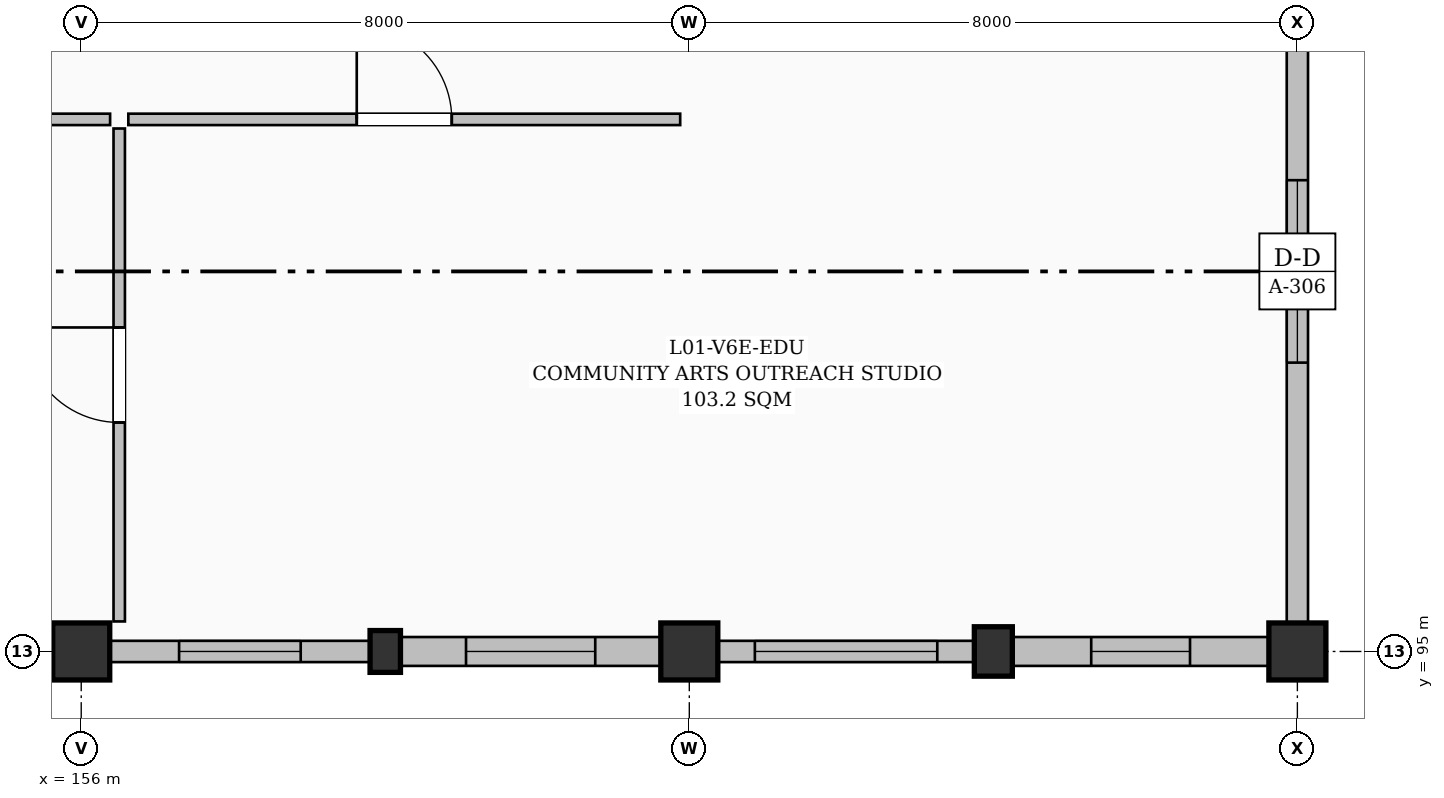
"""IFC4 building model, lengths in metres.
Left out: names, types, materials, properties, quantities, classifications, styles, units other than length and angle.
Written with IfcOpenShell. Run it as: python <this file> out.ifc"""

import sys

from ifc_helpers import new_model, si_unit, direction, frame, frame_2d, origin, origin_2d, place, context, subcontext, project, spatial, rectangle, extrude, element, fill, save


model = new_model("IFC4")
c1 = context("Model", 3, precision=1e-05, world=origin(), true_north=direction((0.0, 1.0)))
c2 = subcontext(c1, "Body", "Model", "MODEL_VIEW")
j1 = project(units=[si_unit("LENGTHUNIT", "METRE"), si_unit("PLANEANGLEUNIT", "RADIAN")], contexts=[c1])
p1 = place(None, origin())
s1 = spatial("IfcSite", under=j1, at=p1, CompositionType="ELEMENT")
p2 = place(p1, origin())
s2 = spatial("IfcBuilding", under=s1, at=p2, CompositionType="ELEMENT")
p3 = place(p2, frame((0.0, 0.0, 4.8)))
s3 = spatial("IfcBuildingStorey", under=s2, at=p3, CompositionType="ELEMENT", Elevation=4.8)
p4 = place(p3, frame((156.0, 95.0, 0.0), z_axis=(0.0, 0.0, 1.0), x_axis=(1.0, 0.0, 0.0)))
e1 = element("IfcColumn", 1, at=p4, inside=s3, PredefinedType="COLUMN", context=c2, shape_type="SweptSolid", body=[
    extrude(rectangle(XDim=0.75, YDim=0.75, at=origin_2d()), origin(), (0.0, 0.0, 1.0), 4.5),
])
p5 = place(p3, frame((160.0, 95.0, 0.0), z_axis=(0.0, 0.0, 1.0), x_axis=(1.0, 0.0, 0.0)))
e2 = element("IfcColumn", 2, at=p5, inside=s3, PredefinedType="PILASTER", context=c2, shape_type="SweptSolid", body=[
    extrude(rectangle(XDim=0.4, YDim=0.55, at=origin_2d()), origin(), (0.0, 0.0, 1.0), 4.5),
])
p6 = place(p3, frame((164.0, 95.0, 0.0), z_axis=(0.0, 0.0, 1.0), x_axis=(1.0, 0.0, 0.0)))
e3 = element("IfcColumn", 3, at=p6, inside=s3, PredefinedType="COLUMN", context=c2, shape_type="SweptSolid", body=[
    extrude(rectangle(XDim=0.75, YDim=0.75, at=origin_2d()), origin(), (0.0, 0.0, 1.0), 4.5),
])
p7 = place(p3, frame((168.0, 95.0, 0.0), z_axis=(0.0, 0.0, 1.0), x_axis=(1.0, 0.0, 0.0)))
e4 = element("IfcColumn", 4, at=p7, inside=s3, PredefinedType="PILASTER", context=c2, shape_type="SweptSolid", body=[
    extrude(rectangle(XDim=0.5, YDim=0.65, at=origin_2d()), origin(), (0.0, 0.0, 1.0), 4.5),
])
p8 = place(p3, frame((172.0, 95.0, 0.0), z_axis=(0.0, 0.0, 1.0), x_axis=(1.0, 0.0, 0.0)))
e5 = element("IfcColumn", 5, at=p8, inside=s3, PredefinedType="COLUMN", context=c2, shape_type="SweptSolid", body=[
    extrude(rectangle(XDim=0.75, YDim=0.75, at=origin_2d()), origin(), (0.0, 0.0, 1.0), 4.5),
])
p9 = place(p3, frame((172.0, 104.625, 0.0), z_axis=(0.0, 0.0, 1.0), x_axis=(0.0, -1.0, 0.0)))
e6 = element("IfcWall", 6, at=p9, inside=s3, PredefinedType="SOLIDWALL", context=c2, shape_type="SweptSolid", body=[
    extrude(rectangle(XDim=9.25, YDim=0.28, at=frame_2d((4.625, 0.0))), origin(), (0.0, 0.0, 1.0), 4.035),
])
p10 = place(p9, frame((3.425, 0.0, 0.95)))
e7 = element("IfcOpeningElement", 7, at=p10, cuts=e6, PredefinedType="OPENING", context=c2, shape_type="SweptSolid", body=[
    extrude(rectangle(XDim=2.4, YDim=1.2, at=frame_2d((1.2, 0.6))), frame((0.0, 0.15, 0.0), z_axis=(0.0, -1.0, 0.0), x_axis=(1.0, 0.0, 0.0)), (0.0, 0.0, 1.0), 0.3),
])
p11 = place(p3, frame((171.625, 95.0, 0.0), z_axis=(0.0, 0.0, 1.0), x_axis=(-1.0, 0.0, 0.0)))
e8 = element("IfcWall", 8, at=p11, inside=s3, PredefinedType="SOLIDWALL", context=c2, shape_type="SweptSolid", body=[
    extrude(rectangle(XDim=3.375, YDim=0.38, at=frame_2d((1.688, 0.0))), origin(), (0.0, 0.0, 1.0), 3.635),
])
p12 = place(p11, frame((1.038, 0.0, 0.95)))
e9 = element("IfcOpeningElement", 9, at=p12, cuts=e8, PredefinedType="OPENING", context=c2, shape_type="SweptSolid", body=[
    extrude(rectangle(XDim=1.3, YDim=1.4, at=frame_2d((0.65, 0.7))), frame((0.0, 0.2, 0.0), z_axis=(0.0, -1.0, 0.0), x_axis=(1.0, 0.0, 0.0)), (0.0, 0.0, 1.0), 0.4),
])
p13 = place(p3, frame((167.75, 95.0, 0.0), z_axis=(0.0, 0.0, 1.0), x_axis=(-1.0, 0.0, 0.0)))
e10 = element("IfcWall", 10, at=p13, inside=s3, PredefinedType="SOLIDWALL", context=c2, shape_type="SweptSolid", body=[
    extrude(rectangle(XDim=3.375, YDim=0.28, at=frame_2d((1.688, 0.0))), origin(), (0.0, 0.0, 1.0), 3.635),
])
p14 = place(p13, frame((0.488, 0.0, 0.95)))
e11 = element("IfcOpeningElement", 11, at=p14, cuts=e10, PredefinedType="OPENING", context=c2, shape_type="SweptSolid", body=[
    extrude(rectangle(XDim=2.4, YDim=1.2, at=frame_2d((1.2, 0.6))), frame((0.0, 0.15, 0.0), z_axis=(0.0, -1.0, 0.0), x_axis=(1.0, 0.0, 0.0)), (0.0, 0.0, 1.0), 0.3),
])
p15 = place(p3, frame((163.625, 95.0, 0.0), z_axis=(0.0, 0.0, 1.0), x_axis=(-1.0, 0.0, 0.0)))
e12 = element("IfcWall", 12, at=p15, inside=s3, PredefinedType="SOLIDWALL", context=c2, shape_type="SweptSolid", body=[
    extrude(rectangle(XDim=3.425, YDim=0.38, at=frame_2d((1.712, 0.0))), origin(), (0.0, 0.0, 1.0), 3.685),
])
p16 = place(p15, frame((0.863, 0.0, 0.95)))
e13 = element("IfcOpeningElement", 13, at=p16, cuts=e12, PredefinedType="OPENING", context=c2, shape_type="SweptSolid", body=[
    extrude(rectangle(XDim=1.7, YDim=2.0, at=frame_2d((0.85, 1.0))), frame((0.0, 0.2, 0.0), z_axis=(0.0, -1.0, 0.0), x_axis=(1.0, 0.0, 0.0)), (0.0, 0.0, 1.0), 0.4),
])
p17 = place(p3, frame((159.8, 95.0, 0.0), z_axis=(0.0, 0.0, 1.0), x_axis=(-1.0, 0.0, 0.0)))
e14 = element("IfcWall", 14, at=p17, inside=s3, PredefinedType="SOLIDWALL", context=c2, shape_type="SweptSolid", body=[
    extrude(rectangle(XDim=3.425, YDim=0.28, at=frame_2d((1.712, 0.0))), origin(), (0.0, 0.0, 1.0), 3.685),
])
p18 = place(p17, frame((0.913, 0.0, 0.95)))
e15 = element("IfcOpeningElement", 15, at=p18, cuts=e14, PredefinedType="OPENING", context=c2, shape_type="SweptSolid", body=[
    extrude(rectangle(XDim=1.6, YDim=1.8, at=frame_2d((0.8, 0.9))), frame((0.0, 0.15, 0.0), z_axis=(0.0, -1.0, 0.0), x_axis=(1.0, 0.0, 0.0)), (0.0, 0.0, 1.0), 0.3),
])
p19 = place(p3, frame((155.625, 95.0, 0.0), z_axis=(0.0, 0.0, 1.0), x_axis=(-1.0, 0.0, 0.0)))
e16 = element("IfcWall", 16, at=p19, inside=s3, PredefinedType="SOLIDWALL", context=c2, shape_type="SweptSolid", body=[
    extrude(rectangle(XDim=3.4, YDim=0.38, at=frame_2d((1.7, 0.0))), origin(), (0.0, 0.0, 1.0), 3.735),
])
p20 = place(p19, frame((0.6, 0.0, 0.95)))
e17 = element("IfcOpeningElement", 17, at=p20, cuts=e16, PredefinedType="OPENING", context=c2, shape_type="SweptSolid", body=[
    extrude(rectangle(XDim=2.2, YDim=1.8, at=frame_2d((1.1, 0.9))), frame((0.0, 0.2, 0.0), z_axis=(0.0, -1.0, 0.0), x_axis=(1.0, 0.0, 0.0)), (0.0, 0.0, 1.0), 0.4),
])
p21 = place(p3, frame((156.62, 102.0, 0.0), z_axis=(0.0, 0.0, 1.0), x_axis=(1.0, 0.0, 0.0)))
e18 = element("IfcWall", 18, at=p21, inside=s3, PredefinedType="PARTITIONING", context=c2, shape_type="SweptSolid", body=[
    extrude(rectangle(XDim=7.26, YDim=0.15, at=frame_2d((3.63, 0.0))), origin(), (0.0, 0.0, 1.0), 3.905),
])
p22 = place(p21, frame((3.005, 0.0, 0.0)))
e19 = element("IfcOpeningElement", 19, at=p22, cuts=e18, PredefinedType="OPENING", context=c2, shape_type="SweptSolid", body=[
    extrude(rectangle(XDim=1.25, YDim=2.15, at=frame_2d((0.625, 1.075))), frame((0.0, 0.085, 0.0), z_axis=(0.0, -1.0, 0.0), x_axis=(1.0, 0.0, 0.0)), (0.0, 0.0, 1.0), 0.17),
])
p23 = place(p3, frame((156.5, 95.395, 0.0), z_axis=(0.0, 0.0, 1.0), x_axis=(0.0, 1.0, 0.0)))
e20 = element("IfcWall", 20, at=p23, inside=s3, PredefinedType="PARTITIONING", context=c2, shape_type="SweptSolid", body=[
    extrude(rectangle(XDim=6.485, YDim=0.15, at=frame_2d((3.242, 0.0))), origin(), (0.0, 0.0, 1.0), 4.25),
])
p24 = place(p23, frame((2.617, 0.0, 0.0)))
e21 = element("IfcOpeningElement", 21, at=p24, cuts=e20, PredefinedType="OPENING", context=c2, shape_type="SweptSolid", body=[
    extrude(rectangle(XDim=1.25, YDim=2.15, at=frame_2d((0.625, 1.075))), frame((0.0, 0.085, 0.0), z_axis=(0.0, -1.0, 0.0), x_axis=(1.0, 0.0, 0.0)), (0.0, 0.0, 1.0), 0.17),
])
p25 = place(p3, frame((148.12, 102.0, 0.0), z_axis=(0.0, 0.0, 1.0), x_axis=(1.0, 0.0, 0.0)))
e22 = element("IfcWall", 22, at=p25, inside=s3, PredefinedType="PARTITIONING", context=c2, shape_type="SweptSolid", body=[
    extrude(rectangle(XDim=8.26, YDim=0.15, at=frame_2d((4.13, 0.0))), origin(), (0.0, 0.0, 1.0), 3.995),
])
p26 = place(p25, frame((3.505, 0.0, 0.0)))
e23 = element("IfcOpeningElement", 23, at=p26, cuts=e22, PredefinedType="OPENING", context=c2, shape_type="SweptSolid", body=[
    extrude(rectangle(XDim=1.25, YDim=2.15, at=frame_2d((0.625, 1.075))), frame((0.0, 0.085, 0.0), z_axis=(0.0, -1.0, 0.0), x_axis=(1.0, 0.0, 0.0)), (0.0, 0.0, 1.0), 0.17),
])
p27 = place(p10, origin())
e24 = element("IfcWindow", 24, at=p27, inside=s3, PartitioningType="TRIPLE_PANEL_HORIZONTAL", PredefinedType="WINDOW", context=c2, shape_type="SweptSolid", body=[
    extrude(rectangle(XDim=2.4, YDim=1.2, at=frame_2d((1.2, 0.6))), frame((0.0, 0.03, 0.0), z_axis=(0.0, -1.0, 0.0), x_axis=(1.0, 0.0, 0.0)), (0.0, 0.0, 1.0), 0.06),
])
fill(e7, e24)
p28 = place(p12, origin())
e25 = element("IfcWindow", 25, at=p28, inside=s3, PartitioningType="SINGLE_PANEL", PredefinedType="WINDOW", context=c2, shape_type="SweptSolid", body=[
    extrude(rectangle(XDim=1.3, YDim=1.4, at=frame_2d((0.65, 0.7))), frame((0.0, 0.03, 0.0), z_axis=(0.0, -1.0, 0.0), x_axis=(1.0, 0.0, 0.0)), (0.0, 0.0, 1.0), 0.06),
])
fill(e9, e25)
p29 = place(p14, origin())
e26 = element("IfcWindow", 26, at=p29, inside=s3, PartitioningType="TRIPLE_PANEL_HORIZONTAL", PredefinedType="WINDOW", context=c2, shape_type="SweptSolid", body=[
    extrude(rectangle(XDim=2.4, YDim=1.2, at=frame_2d((1.2, 0.6))), frame((0.0, 0.03, 0.0), z_axis=(0.0, -1.0, 0.0), x_axis=(1.0, 0.0, 0.0)), (0.0, 0.0, 1.0), 0.06),
])
fill(e11, e26)
p30 = place(p16, origin())
e27 = element("IfcWindow", 27, at=p30, inside=s3, PartitioningType="DOUBLE_PANEL_VERTICAL", PredefinedType="WINDOW", context=c2, shape_type="SweptSolid", body=[
    extrude(rectangle(XDim=1.7, YDim=2.0, at=frame_2d((0.85, 1.0))), frame((0.0, 0.03, 0.0), z_axis=(0.0, -1.0, 0.0), x_axis=(1.0, 0.0, 0.0)), (0.0, 0.0, 1.0), 0.06),
])
fill(e13, e27)
p31 = place(p18, origin())
e28 = element("IfcWindow", 28, at=p31, inside=s3, PartitioningType="DOUBLE_PANEL_VERTICAL", PredefinedType="WINDOW", context=c2, shape_type="SweptSolid", body=[
    extrude(rectangle(XDim=1.6, YDim=1.8, at=frame_2d((0.8, 0.9))), frame((0.0, 0.03, 0.0), z_axis=(0.0, -1.0, 0.0), x_axis=(1.0, 0.0, 0.0)), (0.0, 0.0, 1.0), 0.06),
])
fill(e15, e28)
p32 = place(p22, origin())
e29 = element("IfcDoor", 29, at=p32, inside=s3, OperationType="SINGLE_SWING_LEFT", PredefinedType="DOOR", context=c2, shape_type="SweptSolid", body=[
    extrude(rectangle(XDim=1.25, YDim=2.15, at=frame_2d((0.625, 1.075))), frame((0.0, 0.025, 0.0), z_axis=(0.0, -1.0, 0.0), x_axis=(1.0, 0.0, 0.0)), (0.0, 0.0, 1.0), 0.05),
])
fill(e19, e29)
p33 = place(p24, origin())
e30 = element("IfcDoor", 30, at=p33, inside=s3, OperationType="SINGLE_SWING_RIGHT", PredefinedType="DOOR", context=c2, shape_type="SweptSolid", body=[
    extrude(rectangle(XDim=1.25, YDim=2.15, at=frame_2d((0.625, 1.075))), frame((0.0, 0.025, 0.0), z_axis=(0.0, -1.0, 0.0), x_axis=(1.0, 0.0, 0.0)), (0.0, 0.0, 1.0), 0.05),
])
fill(e21, e30)
save(model, sys.argv[1])
